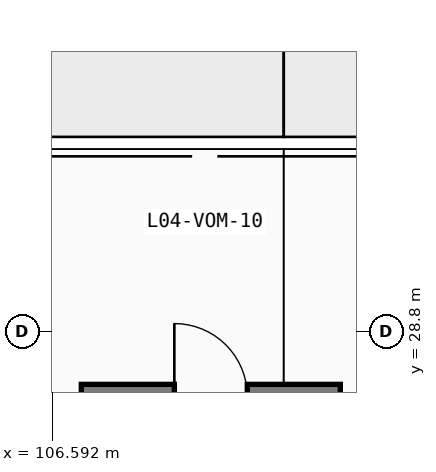
"""IFC4 building model, lengths in metres.
Left out: names, types, materials, properties, quantities, classifications, styles, units other than length and angle.
Written with IfcOpenShell. Run it as: python <this file> out.ifc"""

import sys

from ifc_helpers import new_model, si_unit, direction, frame, frame_2d, origin, place, context, subcontext, project, spatial, rectangle, extrude, element, save


model = new_model("IFC4")
c1 = context("Model", 3, precision=1e-05, world=origin(), true_north=direction((0.0, 1.0)))
c2 = subcontext(c1, "Body", "Model", "MODEL_VIEW")
j1 = project(units=[si_unit("LENGTHUNIT", "METRE"), si_unit("PLANEANGLEUNIT", "RADIAN")], contexts=[c1])
p1 = place(None, origin())
s1 = spatial("IfcSite", under=j1, at=p1, CompositionType="ELEMENT")
p2 = place(p1, origin())
s2 = spatial("IfcBuilding", under=s1, at=p2, CompositionType="ELEMENT")
p3 = place(p2, frame((0.0, 0.0, 18.6)))
s3 = spatial("IfcBuildingStorey", under=s2, at=p3, CompositionType="ELEMENT", Elevation=18.6)
p4 = place(p3, frame((111.33, 27.73, 0.0), z_axis=(0.0, 0.0, 1.0), x_axis=(-1.0, 0.0, 0.0)))
e1 = element("IfcWall", 1, at=p4, inside=s3, PredefinedType="SHEAR", context=c2, shape_type="SweptSolid", body=[
    extrude(rectangle(XDim=4.26, YDim=0.4, at=frame_2d((2.13, 0.0))), origin(), (0.0, 0.0, 1.0), 4.24),
])
p5 = place(p4, frame((2.73, 0.0, 0.0), z_axis=(0.0, 0.0, 1.0), x_axis=(-1.0, 0.0, 0.0)))
e2 = element("IfcOpeningElement", 2, at=p5, cuts=e1, PredefinedType="OPENING", context=c2, shape_type="SweptSolid", body=[
    extrude(rectangle(XDim=1.2, YDim=2.2, at=frame_2d((0.6, 1.1))), frame((0.0, 0.21, 0.0), z_axis=(0.0, -1.0, 0.0), x_axis=(1.0, 0.0, 0.0)), (0.0, 0.0, 1.0), 0.42),
])
save(model, sys.argv[1])
